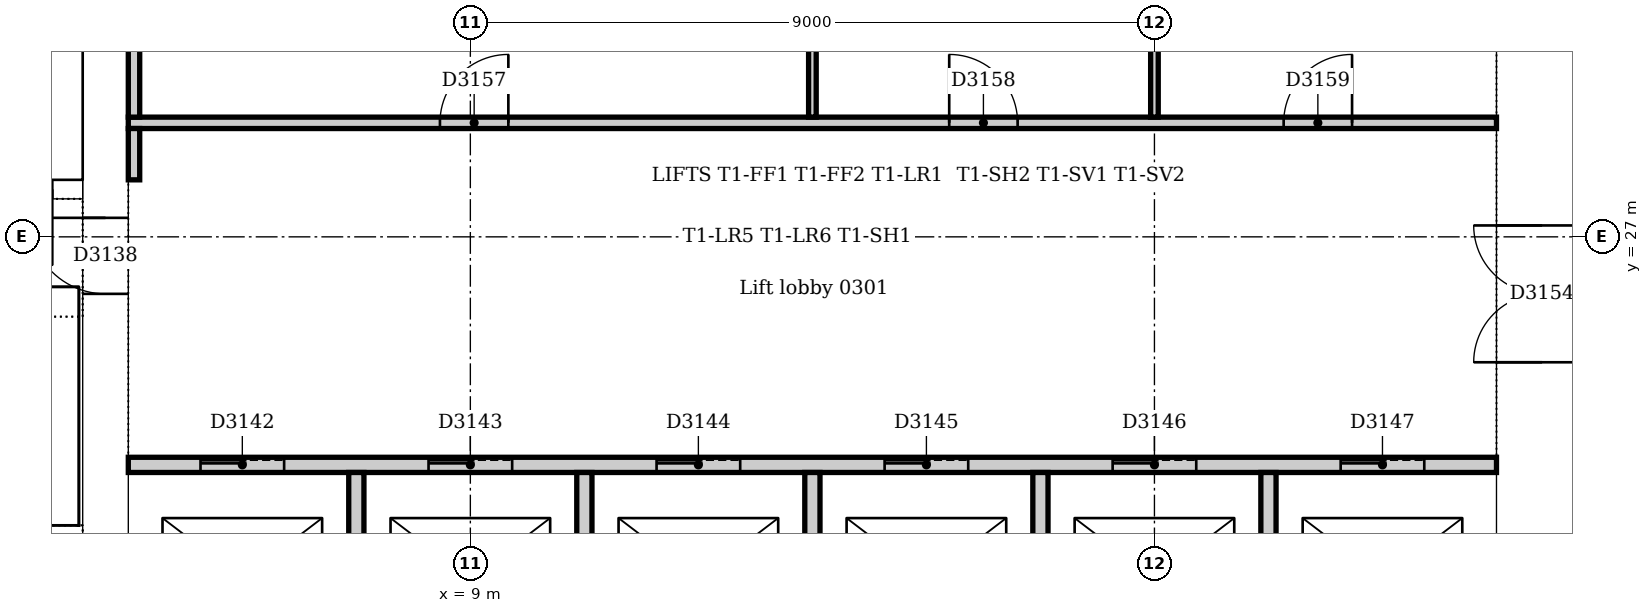
"""IFC4 building model, lengths in metres.
Left out: names, types, materials, properties, quantities, classifications, styles, units other than length and angle.
Written with IfcOpenShell. Run it as: python <this file> out.ifc"""

import sys

from ifc_helpers import new_model, si_unit, direction, frame, frame_2d, origin, place, context, subcontext, project, spatial, rectangle, extrude, element, fill, save


model = new_model("IFC4")
c1 = context("Model", 3, precision=1e-05, world=origin(), true_north=direction((0.0, 1.0)))
c2 = subcontext(c1, "Body", "Model", "MODEL_VIEW")
j1 = project(units=[si_unit("LENGTHUNIT", "METRE"), si_unit("PLANEANGLEUNIT", "RADIAN")], contexts=[c1])
p1 = place(None, origin())
s1 = spatial("IfcSite", under=j1, at=p1, CompositionType="ELEMENT")
p2 = place(p1, origin())
s2 = spatial("IfcBuilding", under=s1, at=p2, CompositionType="ELEMENT")
p3 = place(p2, frame((0.0, 0.0, 16.0)))
s3 = spatial("IfcBuildingStorey", under=s2, at=p3, CompositionType="ELEMENT", Elevation=16.0)
p4 = place(p3, frame((23.1, 21.0, 0.0), z_axis=(0.0, 0.0, 1.0), x_axis=(0.0, 1.0, 0.0)))
e1 = element("IfcWall", 1, at=p4, inside=s3, PredefinedType="SOLIDWALL", context=c2, shape_type="SweptSolid", body=[
    extrude(rectangle(XDim=10.5, YDim=1.2, at=frame_2d((5.25, 0.0))), origin(), (0.0, 0.0, 1.0), 5.0),
])
p5 = place(p4, frame((4.35, 0.0, 0.0)))
e2 = element("IfcOpeningElement", 2, at=p5, cuts=e1, PredefinedType="OPENING", context=c2, shape_type="SweptSolid", body=[
    extrude(rectangle(XDim=1.8, YDim=2.1, at=frame_2d((0.9, 1.05))), frame((0.0, 0.61, 0.0), z_axis=(0.0, -1.0, 0.0), x_axis=(1.0, 0.0, 0.0)), (0.0, 0.0, 1.0), 1.22),
])
p6 = place(p3, frame((4.2, 31.5, 0.0), z_axis=(0.0, 0.0, 1.0), x_axis=(0.0, -1.0, 0.0)))
e3 = element("IfcWall", 3, at=p6, inside=s3, PredefinedType="SOLIDWALL", context=c2, shape_type="SweptSolid", body=[
    extrude(rectangle(XDim=10.5, YDim=0.6, at=frame_2d((5.25, 0.0))), origin(), (0.0, 0.0, 1.0), 5.0),
])
p7 = place(p6, frame((4.25, 0.0, 0.0)))
e4 = element("IfcOpeningElement", 4, at=p7, cuts=e3, PredefinedType="OPENING", context=c2, shape_type="SweptSolid", body=[
    extrude(rectangle(XDim=1.0, YDim=2.1, at=frame_2d((0.5, 1.05))), frame((0.0, 0.31, 0.0), z_axis=(0.0, -1.0, 0.0), x_axis=(1.0, 0.0, 0.0)), (0.0, 0.0, 1.0), 0.62),
])
p8 = place(p3, frame((3.9, 27.625, 0.0), z_axis=(0.0, 0.0, 1.0), x_axis=(-1.0, 0.0, 0.0)))
e5 = element("IfcWall", 5, at=p8, inside=s3, PredefinedType="SOLIDWALL", context=c2, shape_type="SweptSolid", body=[
    extrude(rectangle(XDim=3.54, YDim=0.25, at=frame_2d((1.77, 0.0))), origin(), (0.0, 0.0, 1.0), 5.0),
])
p9 = place(p8, frame((0.4, 0.0, 0.0)))
e6 = element("IfcOpeningElement", 6, at=p9, cuts=e5, PredefinedType="OPENING", context=c2, shape_type="SweptSolid", body=[
    extrude(rectangle(XDim=1.0, YDim=2.1, at=frame_2d((0.5, 1.05))), frame((0.0, 0.135, 0.0), z_axis=(0.0, -1.0, 0.0), x_axis=(1.0, 0.0, 0.0)), (0.0, 0.0, 1.0), 0.27),
])
p10 = place(p3, frame((4.5, 24.0, 0.0), z_axis=(0.0, 0.0, 1.0), x_axis=(1.0, 0.0, 0.0)))
e7 = element("IfcWall", 7, at=p10, inside=s3, PredefinedType="PARTITIONING", context=c2, shape_type="SweptSolid", body=[
    extrude(rectangle(XDim=18.0, YDim=0.2, at=frame_2d((9.0, 0.0))), origin(), (0.0, 0.0, 1.0), 4.7),
])
p11 = place(p10, frame((0.95, 0.0, 0.0)))
e8 = element("IfcOpeningElement", 8, at=p11, cuts=e7, PredefinedType="OPENING", context=c2, shape_type="SweptSolid", body=[
    extrude(rectangle(XDim=1.1, YDim=2.1, at=frame_2d((0.55, 1.05))), frame((0.0, 0.11, 0.0), z_axis=(0.0, -1.0, 0.0), x_axis=(1.0, 0.0, 0.0)), (0.0, 0.0, 1.0), 0.22),
])
p12 = place(p10, frame((3.95, 0.0, 0.0)))
e9 = element("IfcOpeningElement", 9, at=p12, cuts=e7, PredefinedType="OPENING", context=c2, shape_type="SweptSolid", body=[
    extrude(rectangle(XDim=1.1, YDim=2.1, at=frame_2d((0.55, 1.05))), frame((0.0, 0.11, 0.0), z_axis=(0.0, -1.0, 0.0), x_axis=(1.0, 0.0, 0.0)), (0.0, 0.0, 1.0), 0.22),
])
p13 = place(p10, frame((6.95, 0.0, 0.0)))
e10 = element("IfcOpeningElement", 10, at=p13, cuts=e7, PredefinedType="OPENING", context=c2, shape_type="SweptSolid", body=[
    extrude(rectangle(XDim=1.1, YDim=2.1, at=frame_2d((0.55, 1.05))), frame((0.0, 0.11, 0.0), z_axis=(0.0, -1.0, 0.0), x_axis=(1.0, 0.0, 0.0)), (0.0, 0.0, 1.0), 0.22),
])
p14 = place(p10, frame((9.95, 0.0, 0.0)))
e11 = element("IfcOpeningElement", 11, at=p14, cuts=e7, PredefinedType="OPENING", context=c2, shape_type="SweptSolid", body=[
    extrude(rectangle(XDim=1.1, YDim=2.1, at=frame_2d((0.55, 1.05))), frame((0.0, 0.11, 0.0), z_axis=(0.0, -1.0, 0.0), x_axis=(1.0, 0.0, 0.0)), (0.0, 0.0, 1.0), 0.22),
])
p15 = place(p10, frame((12.95, 0.0, 0.0)))
e12 = element("IfcOpeningElement", 12, at=p15, cuts=e7, PredefinedType="OPENING", context=c2, shape_type="SweptSolid", body=[
    extrude(rectangle(XDim=1.1, YDim=2.1, at=frame_2d((0.55, 1.05))), frame((0.0, 0.11, 0.0), z_axis=(0.0, -1.0, 0.0), x_axis=(1.0, 0.0, 0.0)), (0.0, 0.0, 1.0), 0.22),
])
p16 = place(p10, frame((15.95, 0.0, 0.0)))
e13 = element("IfcOpeningElement", 13, at=p16, cuts=e7, PredefinedType="OPENING", context=c2, shape_type="SweptSolid", body=[
    extrude(rectangle(XDim=1.1, YDim=2.1, at=frame_2d((0.55, 1.05))), frame((0.0, 0.11, 0.0), z_axis=(0.0, -1.0, 0.0), x_axis=(1.0, 0.0, 0.0)), (0.0, 0.0, 1.0), 0.22),
])
for number, where, z_axis, x_axis in (
    (14, (7.5, 21.0, 0.0), (0.0, 0.0, 1.0), (0.0, 1.0, 0.0)),
    (15, (10.5, 21.0, 0.0), (0.0, 0.0, 1.0), (0.0, 1.0, 0.0)),
    (16, (13.5, 21.0, 0.0), (0.0, 0.0, 1.0), (0.0, 1.0, 0.0)),
    (17, (16.5, 21.0, 0.0), (0.0, 0.0, 1.0), (0.0, 1.0, 0.0)),
    (18, (19.5, 21.0, 0.0), (0.0, 0.0, 1.0), (0.0, 1.0, 0.0)),
):
    element("IfcWall", number, at=place(p3, frame(where, z_axis=z_axis, x_axis=x_axis)), inside=s3, PredefinedType="PARTITIONING", context=c2, shape_type="SweptSolid", body=[
        extrude(rectangle(XDim=2.9, YDim=0.2, at=frame_2d((1.45, 0.0))), origin(), (0.0, 0.0, 1.0), 4.7),
    ])
p17 = place(p3, frame((4.5, 28.5, 0.0), z_axis=(0.0, 0.0, 1.0), x_axis=(1.0, 0.0, 0.0)))
e19 = element("IfcWall", 19, at=p17, inside=s3, PredefinedType="PARTITIONING", context=c2, shape_type="SweptSolid", body=[
    extrude(rectangle(XDim=18.0, YDim=0.15, at=frame_2d((9.0, 0.0))), origin(), (0.0, 0.0, 1.0), 4.7),
])
p18 = place(p17, frame((4.1, 0.0, 0.0)))
e20 = element("IfcOpeningElement", 20, at=p18, cuts=e19, PredefinedType="OPENING", context=c2, shape_type="SweptSolid", body=[
    extrude(rectangle(XDim=0.9, YDim=2.1, at=frame_2d((0.45, 1.05))), frame((0.0, 0.085, 0.0), z_axis=(0.0, -1.0, 0.0), x_axis=(1.0, 0.0, 0.0)), (0.0, 0.0, 1.0), 0.17),
])
p19 = place(p17, frame((10.8, 0.0, 0.0)))
e21 = element("IfcOpeningElement", 21, at=p19, cuts=e19, PredefinedType="OPENING", context=c2, shape_type="SweptSolid", body=[
    extrude(rectangle(XDim=0.9, YDim=2.1, at=frame_2d((0.45, 1.05))), frame((0.0, 0.085, 0.0), z_axis=(0.0, -1.0, 0.0), x_axis=(1.0, 0.0, 0.0)), (0.0, 0.0, 1.0), 0.17),
])
p20 = place(p17, frame((15.2, 0.0, 0.0)))
e22 = element("IfcOpeningElement", 22, at=p20, cuts=e19, PredefinedType="OPENING", context=c2, shape_type="SweptSolid", body=[
    extrude(rectangle(XDim=0.9, YDim=2.1, at=frame_2d((0.45, 1.05))), frame((0.0, 0.085, 0.0), z_axis=(0.0, -1.0, 0.0), x_axis=(1.0, 0.0, 0.0)), (0.0, 0.0, 1.0), 0.17),
])
p21 = place(p3, frame((4.575, 27.75, 0.0), z_axis=(0.0, 0.0, 1.0), x_axis=(0.0, 1.0, 0.0)))
e23 = element("IfcWall", 23, at=p21, inside=s3, PredefinedType="PARTITIONING", context=c2, shape_type="SweptSolid", body=[
    extrude(rectangle(XDim=0.675, YDim=0.15, at=frame_2d((0.338, 0.0))), origin(), (0.0, 0.0, 1.0), 4.7),
])
p22 = place(p3, frame((4.575, 28.575, 0.0), z_axis=(0.0, 0.0, 1.0), x_axis=(0.0, 1.0, 0.0)))
e24 = element("IfcWall", 24, at=p22, inside=s3, PredefinedType="PARTITIONING", context=c2, shape_type="SweptSolid", body=[
    extrude(rectangle(XDim=2.675, YDim=0.15, at=frame_2d((1.337, 0.0))), origin(), (0.0, 0.0, 1.0), 4.7),
])
for number, where, z_axis, x_axis in (
    (25, (13.5, 28.575, 0.0), (0.0, 0.0, 1.0), (0.0, 1.0, 0.0)),
    (26, (18.0, 28.575, 0.0), (0.0, 0.0, 1.0), (0.0, 1.0, 0.0)),
):
    element("IfcWall", number, at=place(p3, frame(where, z_axis=z_axis, x_axis=x_axis)), inside=s3, PredefinedType="PARTITIONING", context=c2, shape_type="SweptSolid", body=[
        extrude(rectangle(XDim=2.675, YDim=0.1, at=frame_2d((1.337, 0.0))), origin(), (0.0, 0.0, 1.0), 4.7),
    ])
p23 = place(p7, frame((1.0, 0.0, 0.0), z_axis=(0.0, 0.0, 1.0), x_axis=(-1.0, 0.0, 0.0)))
e27 = element("IfcDoor", 27, at=p23, inside=s3, OperationType="SINGLE_SWING_RIGHT", PredefinedType="DOOR", context=c2, shape_type="SweptSolid", body=[
    extrude(rectangle(XDim=1.0, YDim=2.1, at=frame_2d((0.5, 1.05))), frame((0.0, 0.025, 0.0), z_axis=(0.0, -1.0, 0.0), x_axis=(1.0, 0.0, 0.0)), (0.0, 0.0, 1.0), 0.05),
])
fill(e4, e27)
p24 = place(p11, origin())
e28 = element("IfcDoor", 28, at=p24, inside=s3, OperationType="SLIDING_TO_LEFT", PredefinedType="DOOR", context=c2, shape_type="SweptSolid", body=[
    extrude(rectangle(XDim=1.1, YDim=2.1, at=frame_2d((0.55, 1.05))), frame((0.0, 0.025, 0.0), z_axis=(0.0, -1.0, 0.0), x_axis=(1.0, 0.0, 0.0)), (0.0, 0.0, 1.0), 0.05),
])
fill(e8, e28)
p25 = place(p12, origin())
e29 = element("IfcDoor", 29, at=p25, inside=s3, OperationType="SLIDING_TO_LEFT", PredefinedType="DOOR", context=c2, shape_type="SweptSolid", body=[
    extrude(rectangle(XDim=1.1, YDim=2.1, at=frame_2d((0.55, 1.05))), frame((0.0, 0.025, 0.0), z_axis=(0.0, -1.0, 0.0), x_axis=(1.0, 0.0, 0.0)), (0.0, 0.0, 1.0), 0.05),
])
fill(e9, e29)
p26 = place(p13, origin())
e30 = element("IfcDoor", 30, at=p26, inside=s3, OperationType="SLIDING_TO_LEFT", PredefinedType="DOOR", context=c2, shape_type="SweptSolid", body=[
    extrude(rectangle(XDim=1.1, YDim=2.1, at=frame_2d((0.55, 1.05))), frame((0.0, 0.025, 0.0), z_axis=(0.0, -1.0, 0.0), x_axis=(1.0, 0.0, 0.0)), (0.0, 0.0, 1.0), 0.05),
])
fill(e10, e30)
p27 = place(p14, origin())
e31 = element("IfcDoor", 31, at=p27, inside=s3, OperationType="SLIDING_TO_LEFT", PredefinedType="DOOR", context=c2, shape_type="SweptSolid", body=[
    extrude(rectangle(XDim=1.1, YDim=2.1, at=frame_2d((0.55, 1.05))), frame((0.0, 0.025, 0.0), z_axis=(0.0, -1.0, 0.0), x_axis=(1.0, 0.0, 0.0)), (0.0, 0.0, 1.0), 0.05),
])
fill(e11, e31)
p28 = place(p15, origin())
e32 = element("IfcDoor", 32, at=p28, inside=s3, OperationType="SLIDING_TO_LEFT", PredefinedType="DOOR", context=c2, shape_type="SweptSolid", body=[
    extrude(rectangle(XDim=1.1, YDim=2.1, at=frame_2d((0.55, 1.05))), frame((0.0, 0.025, 0.0), z_axis=(0.0, -1.0, 0.0), x_axis=(1.0, 0.0, 0.0)), (0.0, 0.0, 1.0), 0.05),
])
fill(e12, e32)
p29 = place(p16, origin())
e33 = element("IfcDoor", 33, at=p29, inside=s3, OperationType="SLIDING_TO_LEFT", PredefinedType="DOOR", context=c2, shape_type="SweptSolid", body=[
    extrude(rectangle(XDim=1.1, YDim=2.1, at=frame_2d((0.55, 1.05))), frame((0.0, 0.025, 0.0), z_axis=(0.0, -1.0, 0.0), x_axis=(1.0, 0.0, 0.0)), (0.0, 0.0, 1.0), 0.05),
])
fill(e13, e33)
p30 = place(p5, origin())
e34 = element("IfcDoor", 34, at=p30, inside=s3, OperationType="DOUBLE_DOOR_DOUBLE_SWING", PredefinedType="DOOR", context=c2, shape_type="SweptSolid", body=[
    extrude(rectangle(XDim=1.8, YDim=2.1, at=frame_2d((0.9, 1.05))), frame((0.0, 0.025, 0.0), z_axis=(0.0, -1.0, 0.0), x_axis=(1.0, 0.0, 0.0)), (0.0, 0.0, 1.0), 0.05),
])
fill(e2, e34)
p31 = place(p18, origin())
e35 = element("IfcDoor", 35, at=p31, inside=s3, OperationType="SINGLE_SWING_RIGHT", PredefinedType="DOOR", context=c2, shape_type="SweptSolid", body=[
    extrude(rectangle(XDim=0.9, YDim=2.1, at=frame_2d((0.45, 1.05))), frame((0.0, 0.025, 0.0), z_axis=(0.0, -1.0, 0.0), x_axis=(1.0, 0.0, 0.0)), (0.0, 0.0, 1.0), 0.05),
])
fill(e20, e35)
p32 = place(p19, origin())
e36 = element("IfcDoor", 36, at=p32, inside=s3, OperationType="SINGLE_SWING_LEFT", PredefinedType="DOOR", context=c2, shape_type="SweptSolid", body=[
    extrude(rectangle(XDim=0.9, YDim=2.1, at=frame_2d((0.45, 1.05))), frame((0.0, 0.025, 0.0), z_axis=(0.0, -1.0, 0.0), x_axis=(1.0, 0.0, 0.0)), (0.0, 0.0, 1.0), 0.05),
])
fill(e21, e36)
p33 = place(p20, origin())
e37 = element("IfcDoor", 37, at=p33, inside=s3, OperationType="SINGLE_SWING_RIGHT", PredefinedType="DOOR", context=c2, shape_type="SweptSolid", body=[
    extrude(rectangle(XDim=0.9, YDim=2.1, at=frame_2d((0.45, 1.05))), frame((0.0, 0.025, 0.0), z_axis=(0.0, -1.0, 0.0), x_axis=(1.0, 0.0, 0.0)), (0.0, 0.0, 1.0), 0.05),
])
fill(e22, e37)
save(model, sys.argv[1])
